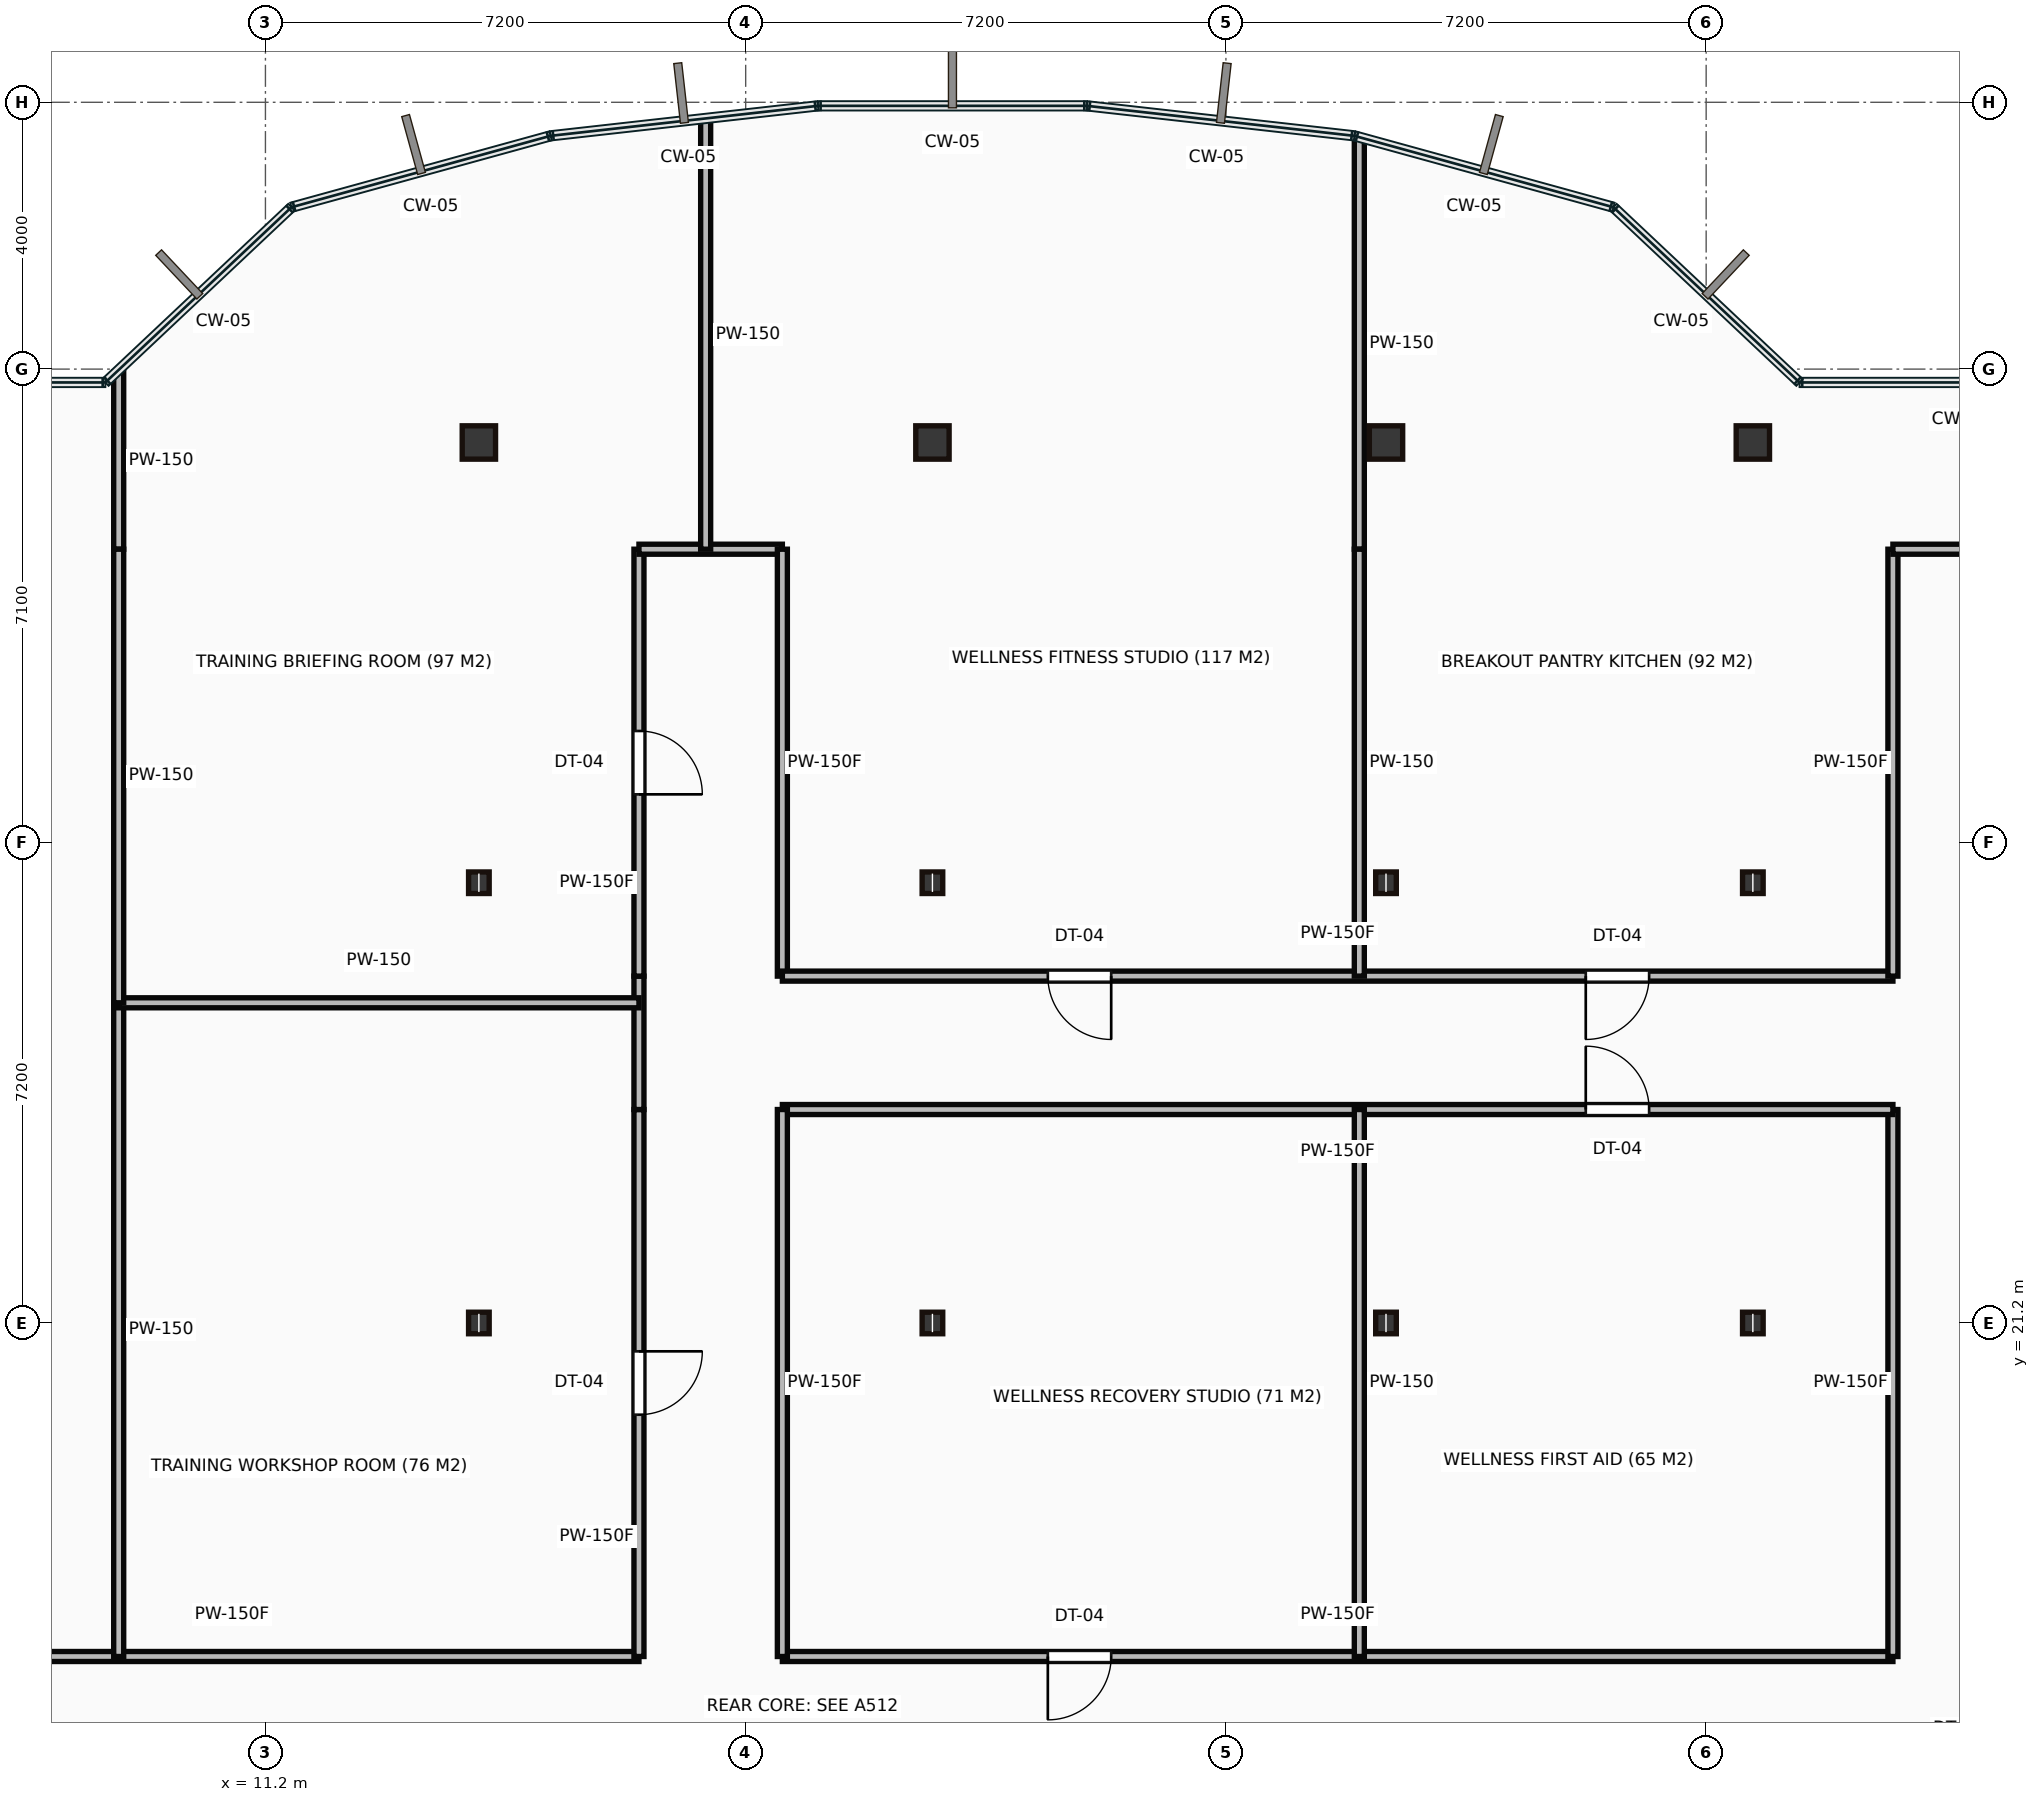
"""IFC4 building model, lengths in metres.
Left out: names, types, materials, properties, quantities, classifications, styles, units other than length and angle.
Written with IfcOpenShell. Run it as: python <this file> out.ifc"""

import sys

from ifc_helpers import new_model, si_unit, direction, frame, frame_2d, origin, origin_2d, place, context, subcontext, project, spatial, rectangle, hollow_rectangle, i_section, extrude, source, transform, mapped, element, fill, save


model = new_model("IFC4")
c1 = context("Model", 3, precision=1e-05, world=origin(), true_north=direction((0.0, 1.0)))
c2 = subcontext(c1, "Body", "Model", "MODEL_VIEW")
j1 = project(units=[si_unit("LENGTHUNIT", "METRE"), si_unit("PLANEANGLEUNIT", "RADIAN")], contexts=[c1])
p1 = place(None, origin())
s1 = spatial("IfcSite", under=j1, at=p1, CompositionType="ELEMENT")
p2 = place(p1, origin())
s2 = spatial("IfcBuilding", under=s1, at=p2, CompositionType="ELEMENT")
p3 = place(p2, frame((0.0, 0.0, 280.7)))
s3 = spatial("IfcBuildingStorey", under=s2, at=p3, CompositionType="ELEMENT", Elevation=280.7)
m1 = source(origin(), c2, "Body", "SweptSolid", [
    extrude(i_section(OverallWidth=0.309, OverallDepth=0.323, WebThickness=0.014, FlangeThickness=0.023, at=origin_2d()), origin(), (0.0, 0.0, 1.0), 3.65),
])
for number, where, z_axis, x_axis in (
    (1, (14.4, 21.2, 0.0), (0.0, 0.0, 1.0), (1.0, 0.0, 0.0)),
    (2, (14.4, 27.8, 0.0), (0.0, 0.0, 1.0), (1.0, 0.0, 0.0)),
):
    element("IfcColumn", number, at=place(p3, frame(where, z_axis=z_axis, x_axis=x_axis)), inside=s3, PredefinedType="COLUMN", context=c2, shape_type="MappedRepresentation", body=[
        mapped(m1, transform((0.0, 0.0, 0.0))),
    ])
m2 = source(origin(), c2, "Body", "SweptSolid", [
    extrude(hollow_rectangle(XDim=0.5, YDim=0.5, WallThickness=0.022, at=origin_2d()), origin(), (0.0, 0.0, 1.0), 3.65),
])
p4 = place(p3, frame((14.4, 34.4, 0.0), z_axis=(0.0, 0.0, 1.0), x_axis=(1.0, 0.0, 0.0)))
e3 = element("IfcColumn", 3, at=p4, inside=s3, PredefinedType="COLUMN", context=c2, shape_type="MappedRepresentation", body=[
    mapped(m2, transform((0.0, 0.0, 0.0))),
])
for number, where, z_axis, x_axis in (
    (4, (21.2, 21.2, 0.0), (0.0, 0.0, 1.0), (1.0, 0.0, 0.0)),
    (5, (21.2, 27.8, 0.0), (0.0, 0.0, 1.0), (1.0, 0.0, 0.0)),
):
    element("IfcColumn", number, at=place(p3, frame(where, z_axis=z_axis, x_axis=x_axis)), inside=s3, PredefinedType="COLUMN", context=c2, shape_type="MappedRepresentation", body=[
        mapped(m1, transform((0.0, 0.0, 0.0))),
    ])
p5 = place(p3, frame((21.2, 34.4, 0.0), z_axis=(0.0, 0.0, 1.0), x_axis=(1.0, 0.0, 0.0)))
e6 = element("IfcColumn", 6, at=p5, inside=s3, PredefinedType="COLUMN", context=c2, shape_type="MappedRepresentation", body=[
    mapped(m2, transform((0.0, 0.0, 0.0))),
])
for number, where, z_axis, x_axis in (
    (7, (28.0, 21.2, 0.0), (0.0, 0.0, 1.0), (1.0, 0.0, 0.0)),
    (8, (28.0, 27.8, 0.0), (0.0, 0.0, 1.0), (1.0, 0.0, 0.0)),
):
    element("IfcColumn", number, at=place(p3, frame(where, z_axis=z_axis, x_axis=x_axis)), inside=s3, PredefinedType="COLUMN", context=c2, shape_type="MappedRepresentation", body=[
        mapped(m1, transform((0.0, 0.0, 0.0))),
    ])
p6 = place(p3, frame((28.0, 34.4, 0.0), z_axis=(0.0, 0.0, 1.0), x_axis=(1.0, 0.0, 0.0)))
e9 = element("IfcColumn", 9, at=p6, inside=s3, PredefinedType="COLUMN", context=c2, shape_type="MappedRepresentation", body=[
    mapped(m2, transform((0.0, 0.0, 0.0))),
])
for number, where, z_axis, x_axis in (
    (10, (33.5, 21.2, 0.0), (0.0, 0.0, 1.0), (1.0, 0.0, 0.0)),
    (11, (33.5, 27.8, 0.0), (0.0, 0.0, 1.0), (1.0, 0.0, 0.0)),
):
    element("IfcColumn", number, at=place(p3, frame(where, z_axis=z_axis, x_axis=x_axis)), inside=s3, PredefinedType="COLUMN", context=c2, shape_type="MappedRepresentation", body=[
        mapped(m1, transform((0.0, 0.0, 0.0))),
    ])
p7 = place(p3, frame((33.5, 34.4, 0.0), z_axis=(0.0, 0.0, 1.0), x_axis=(1.0, 0.0, 0.0)))
e12 = element("IfcColumn", 12, at=p7, inside=s3, PredefinedType="COLUMN", context=c2, shape_type="MappedRepresentation", body=[
    mapped(m2, transform((0.0, 0.0, 0.0))),
])
m3 = source(origin(), c2, "Body", "SweptSolid", [
    extrude(rectangle(XDim=12.2, YDim=0.15, at=frame_2d((6.1, 0.0))), origin(), (0.0, 0.0, 1.0), 3.4),
])
p8 = place(p3, frame((4.6, 16.2, 0.0), z_axis=(0.0, 0.0, 1.0), x_axis=(1.0, 0.0, 0.0)))
e13 = element("IfcWall", 13, at=p8, inside=s3, PredefinedType="PARTITIONING", context=c2, shape_type="MappedRepresentation", body=[
    mapped(m3, transform((0.0, 0.0, 0.0))),
])
p9 = place(p8, frame((1.855, 0.0, 0.0)))
e14 = element("IfcOpeningElement", 14, at=p9, cuts=e13, PredefinedType="OPENING", context=c2, shape_type="SweptSolid", body=[
    extrude(rectangle(XDim=0.95, YDim=2.15, at=frame_2d((0.475, 1.075))), frame((0.0, 0.085, 0.0), z_axis=(0.0, -1.0, 0.0), x_axis=(1.0, 0.0, 0.0)), (0.0, 0.0, 1.0), 0.17),
])
m4 = source(origin(), c2, "Body", "SweptSolid", [
    extrude(rectangle(XDim=8.2, YDim=0.15, at=frame_2d((4.1, 0.0))), origin(), (0.0, 0.0, 1.0), 3.4),
])
p10 = place(p3, frame((16.8, 16.2, 0.0), z_axis=(0.0, 0.0, 1.0), x_axis=(0.0, 1.0, 0.0)))
e15 = element("IfcWall", 15, at=p10, inside=s3, PredefinedType="PARTITIONING", context=c2, shape_type="MappedRepresentation", body=[
    mapped(m4, transform((0.0, 0.0, 0.0))),
])
p11 = place(p10, frame((3.625, 0.0, 0.0)))
e16 = element("IfcOpeningElement", 16, at=p11, cuts=e15, PredefinedType="OPENING", context=c2, shape_type="SweptSolid", body=[
    extrude(rectangle(XDim=0.95, YDim=2.15, at=frame_2d((0.475, 1.075))), frame((0.0, 0.085, 0.0), z_axis=(0.0, -1.0, 0.0), x_axis=(1.0, 0.0, 0.0)), (0.0, 0.0, 1.0), 0.17),
])
m5 = source(origin(), c2, "Body", "SweptSolid", [
    extrude(rectangle(XDim=2.0, YDim=0.15, at=frame_2d((1.0, 0.0))), origin(), (0.0, 0.0, 1.0), 3.4),
])
p12 = place(p3, frame((16.8, 24.4, 0.0), z_axis=(0.0, 0.0, 1.0), x_axis=(0.0, 1.0, 0.0)))
e17 = element("IfcWall", 17, at=p12, inside=s3, PredefinedType="PARTITIONING", context=c2, shape_type="MappedRepresentation", body=[
    mapped(m5, transform((0.0, 0.0, 0.0))),
])
m6 = source(origin(), c2, "Body", "SweptSolid", [
    extrude(rectangle(XDim=6.4, YDim=0.15, at=frame_2d((3.2, 0.0))), origin(), (0.0, 0.0, 1.0), 3.4),
])
p13 = place(p3, frame((16.8, 26.4, 0.0), z_axis=(0.0, 0.0, 1.0), x_axis=(0.0, 1.0, 0.0)))
e18 = element("IfcWall", 18, at=p13, inside=s3, PredefinedType="PARTITIONING", context=c2, shape_type="MappedRepresentation", body=[
    mapped(m6, transform((0.0, 0.0, 0.0))),
])
p14 = place(p13, frame((2.725, 0.0, 0.0)))
e19 = element("IfcOpeningElement", 19, at=p14, cuts=e18, PredefinedType="OPENING", context=c2, shape_type="SweptSolid", body=[
    extrude(rectangle(XDim=0.95, YDim=2.15, at=frame_2d((0.475, 1.075))), frame((0.0, 0.085, 0.0), z_axis=(0.0, -1.0, 0.0), x_axis=(1.0, 0.0, 0.0)), (0.0, 0.0, 1.0), 0.17),
])
m7 = source(origin(), c2, "Body", "SweptSolid", [
    extrude(rectangle(XDim=2.15, YDim=0.15, at=frame_2d((1.075, 0.0))), origin(), (0.0, 0.0, 1.0), 3.4),
])
p15 = place(p3, frame((16.8, 32.8, 0.0), z_axis=(0.0, 0.0, 1.0), x_axis=(1.0, 0.0, 0.0)))
e20 = element("IfcWall", 20, at=p15, inside=s3, PredefinedType="PARTITIONING", context=c2, shape_type="MappedRepresentation", body=[
    mapped(m7, transform((0.0, 0.0, 0.0))),
])
p16 = place(p3, frame((18.95, 32.8, 0.0), z_axis=(0.0, 0.0, 1.0), x_axis=(0.0, -1.0, 0.0)))
e21 = element("IfcWall", 21, at=p16, inside=s3, PredefinedType="PARTITIONING", context=c2, shape_type="MappedRepresentation", body=[
    mapped(m6, transform((0.0, 0.0, 0.0))),
])
m8 = source(origin(), c2, "Body", "SweptSolid", [
    extrude(rectangle(XDim=16.65, YDim=0.15, at=frame_2d((8.325, 0.0))), origin(), (0.0, 0.0, 1.0), 3.4),
])
p17 = place(p3, frame((18.95, 26.4, 0.0), z_axis=(0.0, 0.0, 1.0), x_axis=(1.0, 0.0, 0.0)))
e22 = element("IfcWall", 22, at=p17, inside=s3, PredefinedType="PARTITIONING", context=c2, shape_type="MappedRepresentation", body=[
    mapped(m8, transform((0.0, 0.0, 0.0))),
])
p18 = place(p17, frame((3.98, 0.0, 0.0)))
e23 = element("IfcOpeningElement", 23, at=p18, cuts=e22, PredefinedType="OPENING", context=c2, shape_type="SweptSolid", body=[
    extrude(rectangle(XDim=0.95, YDim=2.15, at=frame_2d((0.475, 1.075))), frame((0.0, 0.085, 0.0), z_axis=(0.0, -1.0, 0.0), x_axis=(1.0, 0.0, 0.0)), (0.0, 0.0, 1.0), 0.17),
])
p19 = place(p17, frame((12.045, 0.0, 0.0)))
e24 = element("IfcOpeningElement", 24, at=p19, cuts=e22, PredefinedType="OPENING", context=c2, shape_type="SweptSolid", body=[
    extrude(rectangle(XDim=0.95, YDim=2.15, at=frame_2d((0.475, 1.075))), frame((0.0, 0.085, 0.0), z_axis=(0.0, -1.0, 0.0), x_axis=(1.0, 0.0, 0.0)), (0.0, 0.0, 1.0), 0.17),
])
p20 = place(p3, frame((35.6, 26.4, 0.0), z_axis=(0.0, 0.0, 1.0), x_axis=(0.0, 1.0, 0.0)))
e25 = element("IfcWall", 25, at=p20, inside=s3, PredefinedType="PARTITIONING", context=c2, shape_type="MappedRepresentation", body=[
    mapped(m6, transform((0.0, 0.0, 0.0))),
])
p21 = place(p3, frame((35.6, 32.8, 0.0), z_axis=(0.0, 0.0, 1.0), x_axis=(1.0, 0.0, 0.0)))
e26 = element("IfcWall", 26, at=p21, inside=s3, PredefinedType="PARTITIONING", context=c2, shape_type="MappedRepresentation", body=[
    mapped(m7, transform((0.0, 0.0, 0.0))),
])
p22 = place(p3, frame((18.95, 16.2, 0.0), z_axis=(0.0, 0.0, 1.0), x_axis=(1.0, 0.0, 0.0)))
e27 = element("IfcWall", 27, at=p22, inside=s3, PredefinedType="PARTITIONING", context=c2, shape_type="MappedRepresentation", body=[
    mapped(m8, transform((0.0, 0.0, 0.0))),
])
p23 = place(p22, frame((3.98, 0.0, 0.0)))
e28 = element("IfcOpeningElement", 28, at=p23, cuts=e27, PredefinedType="OPENING", context=c2, shape_type="SweptSolid", body=[
    extrude(rectangle(XDim=0.95, YDim=2.15, at=frame_2d((0.475, 1.075))), frame((0.0, 0.085, 0.0), z_axis=(0.0, -1.0, 0.0), x_axis=(1.0, 0.0, 0.0)), (0.0, 0.0, 1.0), 0.17),
])
p24 = place(p3, frame((35.6, 16.2, 0.0), z_axis=(0.0, 0.0, 1.0), x_axis=(0.0, 1.0, 0.0)))
e29 = element("IfcWall", 29, at=p24, inside=s3, PredefinedType="PARTITIONING", context=c2, shape_type="MappedRepresentation", body=[
    mapped(m4, transform((0.0, 0.0, 0.0))),
])
p25 = place(p3, frame((35.6, 24.4, 0.0), z_axis=(0.0, 0.0, 1.0), x_axis=(-1.0, 0.0, 0.0)))
e30 = element("IfcWall", 30, at=p25, inside=s3, PredefinedType="PARTITIONING", context=c2, shape_type="MappedRepresentation", body=[
    mapped(m8, transform((0.0, 0.0, 0.0))),
])
p26 = place(p25, frame((3.655, 0.0, 0.0)))
e31 = element("IfcOpeningElement", 31, at=p26, cuts=e30, PredefinedType="OPENING", context=c2, shape_type="SweptSolid", body=[
    extrude(rectangle(XDim=0.95, YDim=2.15, at=frame_2d((0.475, 1.075))), frame((0.0, 0.085, 0.0), z_axis=(0.0, -1.0, 0.0), x_axis=(1.0, 0.0, 0.0)), (0.0, 0.0, 1.0), 0.17),
])
p27 = place(p3, frame((18.95, 24.4, 0.0), z_axis=(0.0, 0.0, 1.0), x_axis=(0.0, -1.0, 0.0)))
e32 = element("IfcWall", 32, at=p27, inside=s3, PredefinedType="PARTITIONING", context=c2, shape_type="MappedRepresentation", body=[
    mapped(m4, transform((0.0, 0.0, 0.0))),
])
m9 = source(origin(), c2, "Body", "SweptSolid", [
    extrude(rectangle(XDim=9.8, YDim=0.15, at=frame_2d((4.9, 0.0))), origin(), (0.0, 0.0, 1.0), 3.4),
])
p28 = place(p3, frame((9.0, 26.0, 0.0), z_axis=(0.0, 0.0, 1.0), x_axis=(0.0, -1.0, 0.0)))
e33 = element("IfcWall", 33, at=p28, inside=s3, PredefinedType="PARTITIONING", context=c2, shape_type="MappedRepresentation", body=[
    mapped(m9, transform((0.0, 0.0, 0.0))),
])
m10 = source(origin(), c2, "Body", "SweptSolid", [
    extrude(rectangle(XDim=7.8, YDim=0.15, at=frame_2d((3.9, 0.0))), origin(), (0.0, 0.0, 1.0), 3.4),
])
p29 = place(p3, frame((9.0, 26.0, 0.0), z_axis=(0.0, 0.0, 1.0), x_axis=(1.0, 0.0, 0.0)))
e34 = element("IfcWall", 34, at=p29, inside=s3, PredefinedType="PARTITIONING", context=c2, shape_type="MappedRepresentation", body=[
    mapped(m10, transform((0.0, 0.0, 0.0))),
])
m11 = source(origin(), c2, "Body", "SweptSolid", [
    extrude(rectangle(XDim=2.661, YDim=0.15, at=frame_2d((1.33, 0.0))), origin(), (0.0, 0.0, 1.0), 3.4),
])
p30 = place(p3, frame((9.0, 35.461, 0.0), z_axis=(0.0, 0.0, 1.0), x_axis=(0.0, -1.0, 0.0)))
e35 = element("IfcWall", 35, at=p30, inside=s3, PredefinedType="PARTITIONING", context=c2, shape_type="MappedRepresentation", body=[
    mapped(m11, transform((0.0, 0.0, 0.0))),
])
m12 = source(origin(), c2, "Body", "SweptSolid", [
    extrude(rectangle(XDim=6.8, YDim=0.15, at=frame_2d((3.4, 0.0))), origin(), (0.0, 0.0, 1.0), 3.4),
])
p31 = place(p3, frame((9.0, 32.8, 0.0), z_axis=(0.0, 0.0, 1.0), x_axis=(0.0, -1.0, 0.0)))
e36 = element("IfcWall", 36, at=p31, inside=s3, PredefinedType="PARTITIONING", context=c2, shape_type="MappedRepresentation", body=[
    mapped(m12, transform((0.0, 0.0, 0.0))),
])
m13 = source(origin(), c2, "Body", "SweptSolid", [
    extrude(rectangle(XDim=6.438, YDim=0.15, at=frame_2d((3.219, 0.0))), origin(), (0.0, 0.0, 1.0), 3.4),
])
p32 = place(p3, frame((17.8, 39.238, 0.0), z_axis=(0.0, 0.0, 1.0), x_axis=(0.0, -1.0, 0.0)))
e37 = element("IfcWall", 37, at=p32, inside=s3, PredefinedType="PARTITIONING", context=c2, shape_type="MappedRepresentation", body=[
    mapped(m13, transform((0.0, 0.0, 0.0))),
])
p33 = place(p3, frame((27.6, 24.4, 0.0), z_axis=(0.0, 0.0, 1.0), x_axis=(0.0, -1.0, 0.0)))
e38 = element("IfcWall", 38, at=p33, inside=s3, PredefinedType="PARTITIONING", context=c2, shape_type="MappedRepresentation", body=[
    mapped(m4, transform((0.0, 0.0, 0.0))),
])
m14 = source(origin(), c2, "Body", "SweptSolid", [
    extrude(rectangle(XDim=6.156, YDim=0.15, at=frame_2d((3.078, 0.0))), origin(), (0.0, 0.0, 1.0), 3.4),
])
p34 = place(p3, frame((27.6, 38.956, 0.0), z_axis=(0.0, 0.0, 1.0), x_axis=(0.0, -1.0, 0.0)))
e39 = element("IfcWall", 39, at=p34, inside=s3, PredefinedType="PARTITIONING", context=c2, shape_type="MappedRepresentation", body=[
    mapped(m14, transform((0.0, 0.0, 0.0))),
])
p35 = place(p3, frame((27.6, 32.8, 0.0), z_axis=(0.0, 0.0, 1.0), x_axis=(0.0, -1.0, 0.0)))
e40 = element("IfcWall", 40, at=p35, inside=s3, PredefinedType="PARTITIONING", context=c2, shape_type="MappedRepresentation", body=[
    mapped(m6, transform((0.0, 0.0, 0.0))),
])
m15 = source(origin(), c2, "Body", "SweptSolid", [
    extrude(rectangle(XDim=0.95, YDim=2.15, at=frame_2d((0.475, 1.075))), frame((0.0, 0.025, 0.0), z_axis=(0.0, -1.0, 0.0), x_axis=(1.0, 0.0, 0.0)), (0.0, 0.0, 1.0), 0.05),
])
p36 = place(p11, origin())
e41 = element("IfcDoor", 41, at=p36, inside=s3, OperationType="SINGLE_SWING_RIGHT", PredefinedType="DOOR", context=c2, shape_type="MappedRepresentation", body=[
    mapped(m15, transform((0.0, 0.0, 0.0))),
])
fill(e16, e41)
p37 = place(p14, origin())
e42 = element("IfcDoor", 42, at=p37, inside=s3, OperationType="SINGLE_SWING_LEFT", PredefinedType="DOOR", context=c2, shape_type="MappedRepresentation", body=[
    mapped(m15, transform((0.0, 0.0, 0.0))),
])
fill(e19, e42)
p38 = place(p18, origin())
e43 = element("IfcDoor", 43, at=p38, inside=s3, OperationType="SINGLE_SWING_RIGHT", PredefinedType="DOOR", context=c2, shape_type="MappedRepresentation", body=[
    mapped(m15, transform((0.0, 0.0, 0.0))),
])
fill(e23, e43)
p39 = place(p23, origin())
e44 = element("IfcDoor", 44, at=p39, inside=s3, OperationType="SINGLE_SWING_LEFT", PredefinedType="DOOR", context=c2, shape_type="MappedRepresentation", body=[
    mapped(m15, transform((0.0, 0.0, 0.0))),
])
fill(e28, e44)
p40 = place(p26, origin())
e45 = element("IfcDoor", 45, at=p40, inside=s3, OperationType="SINGLE_SWING_RIGHT", PredefinedType="DOOR", context=c2, shape_type="MappedRepresentation", body=[
    mapped(m15, transform((0.0, 0.0, 0.0))),
])
fill(e31, e45)
p41 = place(p19, origin())
e46 = element("IfcDoor", 46, at=p41, inside=s3, OperationType="SINGLE_SWING_LEFT", PredefinedType="DOOR", context=c2, shape_type="MappedRepresentation", body=[
    mapped(m15, transform((0.0, 0.0, 0.0))),
])
fill(e24, e46)
save(model, sys.argv[1])
